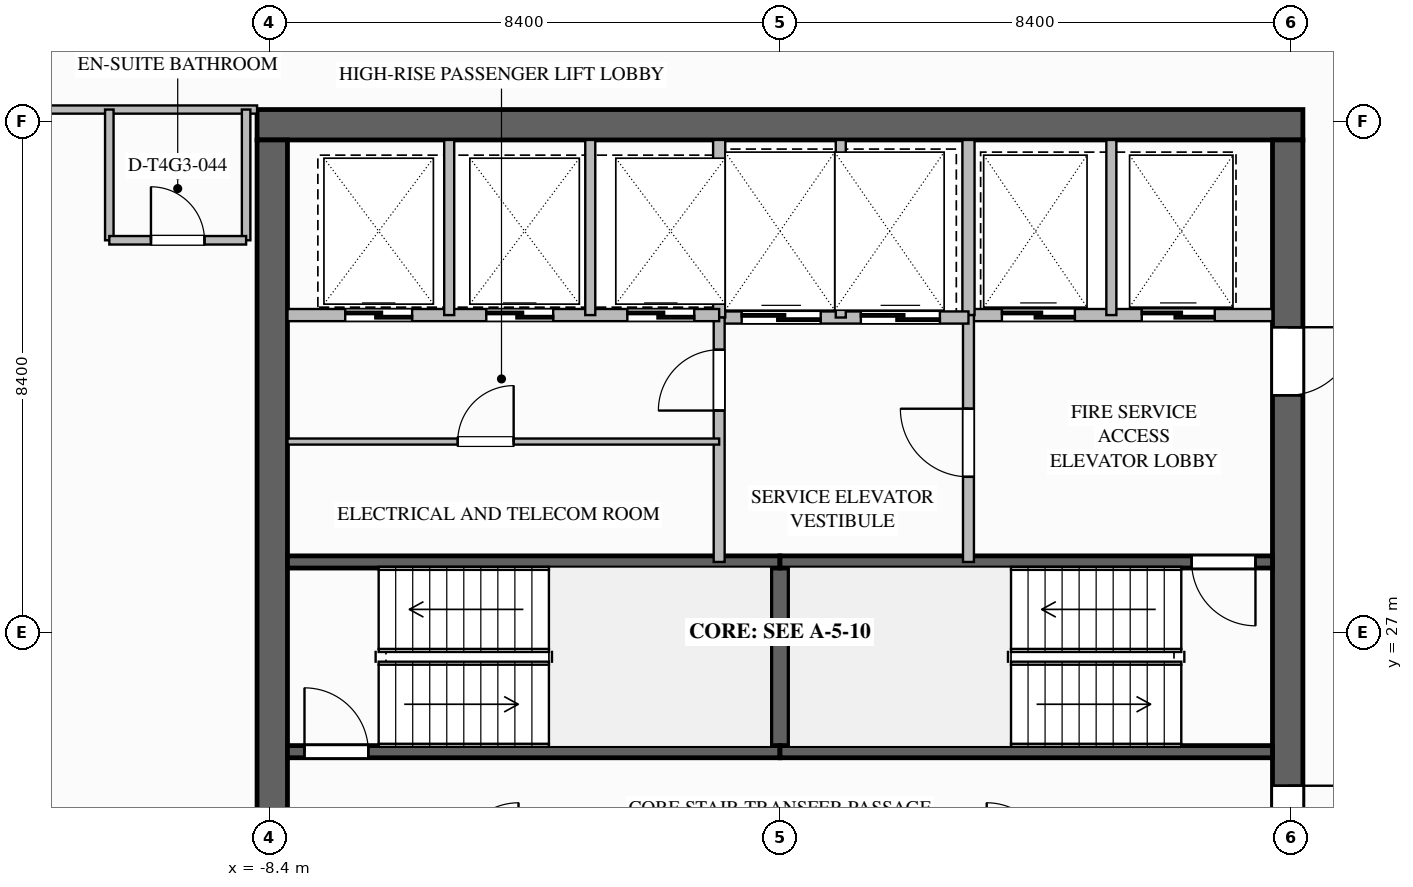
"""IFC4 building model, lengths in metres.
Left out: names, types, materials, properties, quantities, classifications, styles, units other than length and angle.
Written with IfcOpenShell. Run it as: python <this file> out.ifc"""

import sys

from ifc_helpers import new_model, si_unit, direction, frame, frame_2d, origin, place, context, subcontext, project, spatial, rectangle, extrude, element, fill, save


model = new_model("IFC4")
c1 = context("Model", 3, precision=1e-05, world=origin(), true_north=direction((0.0, 1.0)))
c2 = subcontext(c1, "Body", "Model", "MODEL_VIEW")
j1 = project(units=[si_unit("LENGTHUNIT", "METRE"), si_unit("PLANEANGLEUNIT", "RADIAN")], contexts=[c1])
p1 = place(None, origin())
s1 = spatial("IfcSite", under=j1, at=p1, CompositionType="ELEMENT")
p2 = place(p1, origin())
s2 = spatial("IfcBuilding", under=s1, at=p2, CompositionType="ELEMENT")
p3 = place(p2, frame((0.0, 0.0, 226.7)))
s3 = spatial("IfcBuildingStorey", under=s2, at=p3, CompositionType="ELEMENT", Elevation=226.7)
p4 = place(p3, frame((-8.6, 35.35, 0.0), z_axis=(0.0, 0.0, 1.0), x_axis=(1.0, 0.0, 0.0)))
e1 = element("IfcWall", 1, at=p4, inside=s3, PredefinedType="SHEAR", context=c2, shape_type="SweptSolid", body=[
    extrude(rectangle(XDim=17.2, YDim=0.5, at=frame_2d((8.6, 0.0))), origin(), (0.0, 0.0, 1.0), 3.6),
])
p5 = place(p3, frame((8.35, 35.1, 0.0), z_axis=(0.0, 0.0, 1.0), x_axis=(0.0, -1.0, 0.0)))
e2 = element("IfcWall", 2, at=p5, inside=s3, PredefinedType="SHEAR", context=c2, shape_type="SweptSolid", body=[
    extrude(rectangle(XDim=16.2, YDim=0.5, at=frame_2d((8.1, 0.0))), origin(), (0.0, 0.0, 1.0), 3.6),
])
p6 = place(p5, frame((3.08, 0.0, 0.0)))
e3 = element("IfcOpeningElement", 3, at=p6, cuts=e2, PredefinedType="OPENING", context=c2, shape_type="SweptSolid", body=[
    extrude(rectangle(XDim=1.12, YDim=2.1, at=frame_2d((0.56, 1.05))), frame((0.0, 0.26, 0.0), z_axis=(0.0, -1.0, 0.0), x_axis=(1.0, 0.0, 0.0)), (0.0, 0.0, 1.0), 0.52),
])
p7 = place(p5, frame((10.62, 0.0, 0.0)))
e4 = element("IfcOpeningElement", 4, at=p7, cuts=e2, PredefinedType="OPENING", context=c2, shape_type="SweptSolid", body=[
    extrude(rectangle(XDim=1.08, YDim=2.04, at=frame_2d((0.54, 1.02))), frame((0.0, 0.26, 0.0), z_axis=(0.0, -1.0, 0.0), x_axis=(1.0, 0.0, 0.0)), (0.0, 0.0, 1.0), 0.52),
])
p8 = place(p3, frame((-8.35, 18.9, 0.0), z_axis=(0.0, 0.0, 1.0), x_axis=(0.0, 1.0, 0.0)))
e5 = element("IfcWall", 5, at=p8, inside=s3, PredefinedType="SHEAR", context=c2, shape_type="SweptSolid", body=[
    extrude(rectangle(XDim=16.2, YDim=0.5, at=frame_2d((8.1, 0.0))), origin(), (0.0, 0.0, 1.0), 3.6),
])
p9 = place(p3, frame((0.0, 25.04, 0.0), z_axis=(0.0, 0.0, 1.0), x_axis=(0.0, 1.0, 0.0)))
e6 = element("IfcWall", 6, at=p9, inside=s3, PredefinedType="SOLIDWALL", context=c2, shape_type="SweptSolid", body=[
    extrude(rectangle(XDim=3.12, YDim=0.3, at=frame_2d((1.56, 0.0))), origin(), (0.0, 0.0, 1.0), 3.34),
])
p10 = place(p3, frame((-8.1, 25.04, 0.0), z_axis=(0.0, 0.0, 1.0), x_axis=(1.0, 0.0, 0.0)))
e7 = element("IfcWall", 7, at=p10, inside=s3, PredefinedType="SOLIDWALL", context=c2, shape_type="SweptSolid", body=[
    extrude(rectangle(XDim=8.1, YDim=0.2, at=frame_2d((4.05, 0.0))), origin(), (0.0, 0.0, 1.0), 3.34),
])
p11 = place(p10, frame((0.28, 0.0, 0.0)))
e8 = element("IfcOpeningElement", 8, at=p11, cuts=e7, PredefinedType="OPENING", context=c2, shape_type="SweptSolid", body=[
    extrude(rectangle(XDim=1.05, YDim=2.1, at=frame_2d((0.525, 1.05))), frame((0.0, 0.11, 0.0), z_axis=(0.0, -1.0, 0.0), x_axis=(1.0, 0.0, 0.0)), (0.0, 0.0, 1.0), 0.22),
])
for number, where, z_axis, x_axis in (
    (9, (-8.1, 28.16, 0.0), (0.0, 0.0, 1.0), (1.0, 0.0, 0.0)),
    (10, (0.0, 25.04, 0.0), (0.0, 0.0, 1.0), (1.0, 0.0, 0.0)),
):
    element("IfcWall", number, at=place(p3, frame(where, z_axis=z_axis, x_axis=x_axis)), inside=s3, PredefinedType="SOLIDWALL", context=c2, shape_type="SweptSolid", body=[
        extrude(rectangle(XDim=8.1, YDim=0.2, at=frame_2d((4.05, 0.0))), origin(), (0.0, 0.0, 1.0), 3.34),
    ])
p12 = place(p3, frame((8.1, 28.16, 0.0), z_axis=(0.0, 0.0, 1.0), x_axis=(-1.0, 0.0, 0.0)))
e11 = element("IfcWall", 11, at=p12, inside=s3, PredefinedType="SOLIDWALL", context=c2, shape_type="SweptSolid", body=[
    extrude(rectangle(XDim=8.1, YDim=0.2, at=frame_2d((4.05, 0.0))), origin(), (0.0, 0.0, 1.0), 3.34),
])
p13 = place(p12, frame((0.28, 0.0, 0.0)))
e12 = element("IfcOpeningElement", 12, at=p13, cuts=e11, PredefinedType="OPENING", context=c2, shape_type="SweptSolid", body=[
    extrude(rectangle(XDim=1.05, YDim=2.1, at=frame_2d((0.525, 1.05))), frame((0.0, 0.11, 0.0), z_axis=(0.0, -1.0, 0.0), x_axis=(1.0, 0.0, 0.0)), (0.0, 0.0, 1.0), 0.22),
])
p14 = place(p3, frame((3.1, 32.22, 0.0), z_axis=(0.0, 0.0, 1.0), x_axis=(1.0, 0.0, 0.0)))
e13 = element("IfcWall", 13, at=p14, inside=s3, PredefinedType="SOLIDWALL", context=c2, shape_type="SweptSolid", body=[
    extrude(rectangle(XDim=5.0, YDim=0.2, at=frame_2d((2.5, 0.0))), origin(), (0.0, 0.0, 1.0), 3.34),
])
p15 = place(p14, frame((0.55, 0.0, 0.0)))
e14 = element("IfcOpeningElement", 14, at=p15, cuts=e13, PredefinedType="OPENING", context=c2, shape_type="SweptSolid", body=[
    extrude(rectangle(XDim=1.2, YDim=2.2, at=frame_2d((0.6, 1.1))), frame((0.0, 0.11, 0.0), z_axis=(0.0, -1.0, 0.0), x_axis=(1.0, 0.0, 0.0)), (0.0, 0.0, 1.0), 0.22),
])
p16 = place(p14, frame((2.85, 0.0, 0.0)))
e15 = element("IfcOpeningElement", 15, at=p16, cuts=e13, PredefinedType="OPENING", context=c2, shape_type="SweptSolid", body=[
    extrude(rectangle(XDim=1.2, YDim=2.2, at=frame_2d((0.6, 1.1))), frame((0.0, 0.11, 0.0), z_axis=(0.0, -1.0, 0.0), x_axis=(1.0, 0.0, 0.0)), (0.0, 0.0, 1.0), 0.22),
])
p17 = place(p3, frame((3.1, 32.22, 0.0), z_axis=(0.0, 0.0, 1.0), x_axis=(0.0, 1.0, 0.0)))
e16 = element("IfcWall", 16, at=p17, inside=s3, PredefinedType="SOLIDWALL", context=c2, shape_type="SweptSolid", body=[
    extrude(rectangle(XDim=2.88, YDim=0.2, at=frame_2d((1.44, 0.0))), origin(), (0.0, 0.0, 1.0), 3.34),
])
p18 = place(p3, frame((5.45, 32.22, 0.0), z_axis=(0.0, 0.0, 1.0), x_axis=(0.0, 1.0, 0.0)))
e17 = element("IfcWall", 17, at=p18, inside=s3, PredefinedType="PARTITIONING", context=c2, shape_type="SweptSolid", body=[
    extrude(rectangle(XDim=2.88, YDim=0.165, at=frame_2d((1.44, 0.0))), origin(), (0.0, 0.0, 1.0), 3.34),
])
p19 = place(p3, frame((3.1, 28.16, 0.0), z_axis=(0.0, 0.0, 1.0), x_axis=(0.0, 1.0, 0.0)))
e18 = element("IfcWall", 18, at=p19, inside=s3, PredefinedType="SOLIDWALL", context=c2, shape_type="SweptSolid", body=[
    extrude(rectangle(XDim=4.06, YDim=0.18, at=frame_2d((2.03, 0.0))), origin(), (0.0, 0.0, 1.0), 3.34),
])
p20 = place(p19, frame((1.4, 0.0, 0.0)))
e19 = element("IfcOpeningElement", 19, at=p20, cuts=e18, PredefinedType="OPENING", context=c2, shape_type="SweptSolid", body=[
    extrude(rectangle(XDim=1.12, YDim=2.1, at=frame_2d((0.56, 1.05))), frame((0.0, 0.1, 0.0), z_axis=(0.0, -1.0, 0.0), x_axis=(1.0, 0.0, 0.0)), (0.0, 0.0, 1.0), 0.2),
])
p21 = place(p3, frame((-1.0, 32.18, 0.0), z_axis=(0.0, 0.0, 1.0), x_axis=(1.0, 0.0, 0.0)))
e20 = element("IfcWall", 20, at=p21, inside=s3, PredefinedType="SOLIDWALL", context=c2, shape_type="SweptSolid", body=[
    extrude(rectangle(XDim=4.1, YDim=0.2, at=frame_2d((2.05, 0.0))), origin(), (0.0, 0.0, 1.0), 3.34),
])
p22 = place(p21, frame((0.37, 0.0, 0.0)))
e21 = element("IfcOpeningElement", 21, at=p22, cuts=e20, PredefinedType="OPENING", context=c2, shape_type="SweptSolid", body=[
    extrude(rectangle(XDim=1.3, YDim=2.2, at=frame_2d((0.65, 1.1))), frame((0.0, 0.11, 0.0), z_axis=(0.0, -1.0, 0.0), x_axis=(1.0, 0.0, 0.0)), (0.0, 0.0, 1.0), 0.22),
])
p23 = place(p21, frame((2.33, 0.0, 0.0)))
e22 = element("IfcOpeningElement", 22, at=p23, cuts=e20, PredefinedType="OPENING", context=c2, shape_type="SweptSolid", body=[
    extrude(rectangle(XDim=1.3, YDim=2.2, at=frame_2d((0.65, 1.1))), frame((0.0, 0.11, 0.0), z_axis=(0.0, -1.0, 0.0), x_axis=(1.0, 0.0, 0.0)), (0.0, 0.0, 1.0), 0.22),
])
p24 = place(p3, frame((-1.0, 32.18, 0.0), z_axis=(0.0, 0.0, 1.0), x_axis=(0.0, 1.0, 0.0)))
e23 = element("IfcWall", 23, at=p24, inside=s3, PredefinedType="SOLIDWALL", context=c2, shape_type="SweptSolid", body=[
    extrude(rectangle(XDim=2.92, YDim=0.2, at=frame_2d((1.46, 0.0))), origin(), (0.0, 0.0, 1.0), 3.34),
])
p25 = place(p3, frame((1.0, 32.18, 0.0), z_axis=(0.0, 0.0, 1.0), x_axis=(0.0, 1.0, 0.0)))
e24 = element("IfcWall", 24, at=p25, inside=s3, PredefinedType="PARTITIONING", context=c2, shape_type="SweptSolid", body=[
    extrude(rectangle(XDim=2.92, YDim=0.165, at=frame_2d((1.46, 0.0))), origin(), (0.0, 0.0, 1.0), 3.34),
])
p26 = place(p3, frame((-1.0, 28.16, 0.0), z_axis=(0.0, 0.0, 1.0), x_axis=(0.0, 1.0, 0.0)))
e25 = element("IfcWall", 25, at=p26, inside=s3, PredefinedType="SOLIDWALL", context=c2, shape_type="SweptSolid", body=[
    extrude(rectangle(XDim=4.02, YDim=0.18, at=frame_2d((2.01, 0.0))), origin(), (0.0, 0.0, 1.0), 3.34),
])
p27 = place(p26, frame((2.49, 0.0, 0.0)))
e26 = element("IfcOpeningElement", 26, at=p27, cuts=e25, PredefinedType="OPENING", context=c2, shape_type="SweptSolid", body=[
    extrude(rectangle(XDim=1.0, YDim=2.1, at=frame_2d((0.5, 1.05))), frame((0.0, 0.1, 0.0), z_axis=(0.0, -1.0, 0.0), x_axis=(1.0, 0.0, 0.0)), (0.0, 0.0, 1.0), 0.2),
])
p28 = place(p3, frame((-8.1, 32.22, 0.0), z_axis=(0.0, 0.0, 1.0), x_axis=(1.0, 0.0, 0.0)))
e27 = element("IfcWall", 27, at=p28, inside=s3, PredefinedType="SOLIDWALL", context=c2, shape_type="SweptSolid", body=[
    extrude(rectangle(XDim=7.1, YDim=0.2, at=frame_2d((3.55, 0.0))), origin(), (0.0, 0.0, 1.0), 3.34),
])
p29 = place(p28, frame((0.95, 0.0, 0.0)))
e28 = element("IfcOpeningElement", 28, at=p29, cuts=e27, PredefinedType="OPENING", context=c2, shape_type="SweptSolid", body=[
    extrude(rectangle(XDim=1.1, YDim=2.2, at=frame_2d((0.55, 1.1))), frame((0.0, 0.11, 0.0), z_axis=(0.0, -1.0, 0.0), x_axis=(1.0, 0.0, 0.0)), (0.0, 0.0, 1.0), 0.22),
])
p30 = place(p28, frame((3.27, 0.0, 0.0)))
e29 = element("IfcOpeningElement", 29, at=p30, cuts=e27, PredefinedType="OPENING", context=c2, shape_type="SweptSolid", body=[
    extrude(rectangle(XDim=1.1, YDim=2.2, at=frame_2d((0.55, 1.1))), frame((0.0, 0.11, 0.0), z_axis=(0.0, -1.0, 0.0), x_axis=(1.0, 0.0, 0.0)), (0.0, 0.0, 1.0), 0.22),
])
p31 = place(p28, frame((5.59, 0.0, 0.0)))
e30 = element("IfcOpeningElement", 30, at=p31, cuts=e27, PredefinedType="OPENING", context=c2, shape_type="SweptSolid", body=[
    extrude(rectangle(XDim=1.1, YDim=2.2, at=frame_2d((0.55, 1.1))), frame((0.0, 0.11, 0.0), z_axis=(0.0, -1.0, 0.0), x_axis=(1.0, 0.0, 0.0)), (0.0, 0.0, 1.0), 0.22),
])
for number, where, z_axis, x_axis in (
    (31, (-5.44, 32.22, 0.0), (0.0, 0.0, 1.0), (0.0, 1.0, 0.0)),
    (32, (-3.12, 32.22, 0.0), (0.0, 0.0, 1.0), (0.0, 1.0, 0.0)),
):
    element("IfcWall", number, at=place(p3, frame(where, z_axis=z_axis, x_axis=x_axis)), inside=s3, PredefinedType="PARTITIONING", context=c2, shape_type="SweptSolid", body=[
        extrude(rectangle(XDim=2.88, YDim=0.165, at=frame_2d((1.44, 0.0))), origin(), (0.0, 0.0, 1.0), 3.34),
    ])
p32 = place(p3, frame((-8.1, 30.14, 0.0), z_axis=(0.0, 0.0, 1.0), x_axis=(1.0, 0.0, 0.0)))
e33 = element("IfcWall", 33, at=p32, inside=s3, PredefinedType="PARTITIONING", context=c2, shape_type="SweptSolid", body=[
    extrude(rectangle(XDim=7.1, YDim=0.1, at=frame_2d((3.55, 0.0))), origin(), (0.0, 0.0, 1.0), 3.34),
])
p33 = place(p32, frame((2.8, 0.0, 0.0)))
e34 = element("IfcOpeningElement", 34, at=p33, cuts=e33, PredefinedType="OPENING", context=c2, shape_type="SweptSolid", body=[
    extrude(rectangle(XDim=0.92, YDim=2.1, at=frame_2d((0.46, 1.05))), frame((0.0, 0.06, 0.0), z_axis=(0.0, -1.0, 0.0), x_axis=(1.0, 0.0, 0.0)), (0.0, 0.0, 1.0), 0.12),
])
p34 = place(p3, frame((-16.2, 35.6, 0.0), z_axis=(0.0, 0.0, 1.0), x_axis=(1.0, 0.0, 0.0)))
e35 = element("IfcWall", 35, at=p34, inside=s3, PredefinedType="PARTITIONING", context=c2, shape_type="SweptSolid", body=[
    extrude(rectangle(XDim=7.6, YDim=0.135, at=frame_2d((3.8, 0.0))), origin(), (0.0, 0.0, 1.0), 2.718),
])
p35 = place(p34, frame((2.155, 0.0, 0.0)))
e36 = element("IfcOpeningElement", 36, at=p35, cuts=e35, PredefinedType="OPENING", context=c2, shape_type="SweptSolid", body=[
    extrude(rectangle(XDim=1.26, YDim=2.2, at=frame_2d((0.63, 1.1))), frame((0.0, 0.077, 0.0), z_axis=(0.0, -1.0, 0.0), x_axis=(1.0, 0.0, 0.0)), (0.0, 0.0, 1.0), 0.155),
])
for number, where, z_axis, x_axis in (
    (37, (-11.03, 35.6, 0.0), (0.0, 0.0, 1.0), (0.0, -1.0, 0.0)),
    (38, (-8.78, 35.6, 0.0), (0.0, 0.0, 1.0), (0.0, -1.0, 0.0)),
):
    element("IfcWall", number, at=place(p3, frame(where, z_axis=z_axis, x_axis=x_axis)), inside=s3, PredefinedType="PLUMBINGWALL", context=c2, shape_type="SweptSolid", body=[
        extrude(rectangle(XDim=2.15, YDim=0.14, at=frame_2d((1.075, 0.0))), origin(), (0.0, 0.0, 1.0), 3.34),
    ])
p36 = place(p3, frame((-11.03, 33.45, 0.0), z_axis=(0.0, 0.0, 1.0), x_axis=(1.0, 0.0, 0.0)))
e39 = element("IfcWall", 39, at=p36, inside=s3, PredefinedType="PLUMBINGWALL", context=c2, shape_type="SweptSolid", body=[
    extrude(rectangle(XDim=2.25, YDim=0.14, at=frame_2d((1.125, 0.0))), origin(), (0.0, 0.0, 1.0), 3.34),
])
p37 = place(p36, frame((0.685, 0.0, 0.0)))
e40 = element("IfcOpeningElement", 40, at=p37, cuts=e39, PredefinedType="OPENING", context=c2, shape_type="SweptSolid", body=[
    extrude(rectangle(XDim=0.88, YDim=2.1, at=frame_2d((0.44, 1.05))), frame((0.0, 0.08, 0.0), z_axis=(0.0, -1.0, 0.0), x_axis=(1.0, 0.0, 0.0)), (0.0, 0.0, 1.0), 0.16),
])
p38 = place(p11, origin())
e41 = element("IfcDoor", 41, at=p38, inside=s3, OperationType="SINGLE_SWING_LEFT", PredefinedType="DOOR", context=c2, shape_type="SweptSolid", body=[
    extrude(rectangle(XDim=1.05, YDim=2.1, at=frame_2d((0.525, 1.05))), frame((0.0, 0.025, 0.0), z_axis=(0.0, -1.0, 0.0), x_axis=(1.0, 0.0, 0.0)), (0.0, 0.0, 1.0), 0.05),
])
fill(e8, e41)
p39 = place(p13, origin())
e42 = element("IfcDoor", 42, at=p39, inside=s3, OperationType="SINGLE_SWING_LEFT", PredefinedType="DOOR", context=c2, shape_type="SweptSolid", body=[
    extrude(rectangle(XDim=1.05, YDim=2.1, at=frame_2d((0.525, 1.05))), frame((0.0, 0.025, 0.0), z_axis=(0.0, -1.0, 0.0), x_axis=(1.0, 0.0, 0.0)), (0.0, 0.0, 1.0), 0.05),
])
fill(e12, e42)
p40 = place(p15, origin())
e43 = element("IfcDoor", 43, at=p40, inside=s3, OperationType="SLIDING_TO_LEFT", PredefinedType="DOOR", context=c2, shape_type="SweptSolid", body=[
    extrude(rectangle(XDim=1.2, YDim=2.2, at=frame_2d((0.6, 1.1))), frame((0.0, 0.025, 0.0), z_axis=(0.0, -1.0, 0.0), x_axis=(1.0, 0.0, 0.0)), (0.0, 0.0, 1.0), 0.05),
])
fill(e14, e43)
p41 = place(p16, origin())
e44 = element("IfcDoor", 44, at=p41, inside=s3, OperationType="SLIDING_TO_LEFT", PredefinedType="DOOR", context=c2, shape_type="SweptSolid", body=[
    extrude(rectangle(XDim=1.2, YDim=2.2, at=frame_2d((0.6, 1.1))), frame((0.0, 0.025, 0.0), z_axis=(0.0, -1.0, 0.0), x_axis=(1.0, 0.0, 0.0)), (0.0, 0.0, 1.0), 0.05),
])
fill(e15, e44)
p42 = place(p20, origin())
e45 = element("IfcDoor", 45, at=p42, inside=s3, OperationType="SINGLE_SWING_RIGHT", PredefinedType="DOOR", context=c2, shape_type="SweptSolid", body=[
    extrude(rectangle(XDim=1.12, YDim=2.1, at=frame_2d((0.56, 1.05))), frame((0.0, 0.025, 0.0), z_axis=(0.0, -1.0, 0.0), x_axis=(1.0, 0.0, 0.0)), (0.0, 0.0, 1.0), 0.05),
])
fill(e19, e45)
p43 = place(p6, origin())
e46 = element("IfcDoor", 46, at=p43, inside=s3, OperationType="SINGLE_SWING_LEFT", PredefinedType="DOOR", context=c2, shape_type="SweptSolid", body=[
    extrude(rectangle(XDim=1.12, YDim=2.1, at=frame_2d((0.56, 1.05))), frame((0.0, 0.025, 0.0), z_axis=(0.0, -1.0, 0.0), x_axis=(1.0, 0.0, 0.0)), (0.0, 0.0, 1.0), 0.05),
])
fill(e3, e46)
p44 = place(p22, origin())
e47 = element("IfcDoor", 47, at=p44, inside=s3, OperationType="SLIDING_TO_LEFT", PredefinedType="DOOR", context=c2, shape_type="SweptSolid", body=[
    extrude(rectangle(XDim=1.3, YDim=2.2, at=frame_2d((0.65, 1.1))), frame((0.0, 0.025, 0.0), z_axis=(0.0, -1.0, 0.0), x_axis=(1.0, 0.0, 0.0)), (0.0, 0.0, 1.0), 0.05),
])
fill(e21, e47)
p45 = place(p23, origin())
e48 = element("IfcDoor", 48, at=p45, inside=s3, OperationType="SLIDING_TO_LEFT", PredefinedType="DOOR", context=c2, shape_type="SweptSolid", body=[
    extrude(rectangle(XDim=1.3, YDim=2.2, at=frame_2d((0.65, 1.1))), frame((0.0, 0.025, 0.0), z_axis=(0.0, -1.0, 0.0), x_axis=(1.0, 0.0, 0.0)), (0.0, 0.0, 1.0), 0.05),
])
fill(e22, e48)
p46 = place(p27, origin())
e49 = element("IfcDoor", 49, at=p46, inside=s3, OperationType="SINGLE_SWING_LEFT", PredefinedType="DOOR", context=c2, shape_type="SweptSolid", body=[
    extrude(rectangle(XDim=1.0, YDim=2.1, at=frame_2d((0.5, 1.05))), frame((0.0, 0.025, 0.0), z_axis=(0.0, -1.0, 0.0), x_axis=(1.0, 0.0, 0.0)), (0.0, 0.0, 1.0), 0.05),
])
fill(e26, e49)
p47 = place(p29, origin())
e50 = element("IfcDoor", 50, at=p47, inside=s3, OperationType="SLIDING_TO_LEFT", PredefinedType="DOOR", context=c2, shape_type="SweptSolid", body=[
    extrude(rectangle(XDim=1.1, YDim=2.2, at=frame_2d((0.55, 1.1))), frame((0.0, 0.025, 0.0), z_axis=(0.0, -1.0, 0.0), x_axis=(1.0, 0.0, 0.0)), (0.0, 0.0, 1.0), 0.05),
])
fill(e28, e50)
p48 = place(p30, origin())
e51 = element("IfcDoor", 51, at=p48, inside=s3, OperationType="SLIDING_TO_LEFT", PredefinedType="DOOR", context=c2, shape_type="SweptSolid", body=[
    extrude(rectangle(XDim=1.1, YDim=2.2, at=frame_2d((0.55, 1.1))), frame((0.0, 0.025, 0.0), z_axis=(0.0, -1.0, 0.0), x_axis=(1.0, 0.0, 0.0)), (0.0, 0.0, 1.0), 0.05),
])
fill(e29, e51)
p49 = place(p31, origin())
e52 = element("IfcDoor", 52, at=p49, inside=s3, OperationType="SLIDING_TO_LEFT", PredefinedType="DOOR", context=c2, shape_type="SweptSolid", body=[
    extrude(rectangle(XDim=1.1, YDim=2.2, at=frame_2d((0.55, 1.1))), frame((0.0, 0.025, 0.0), z_axis=(0.0, -1.0, 0.0), x_axis=(1.0, 0.0, 0.0)), (0.0, 0.0, 1.0), 0.05),
])
fill(e30, e52)
p50 = place(p33, origin())
e53 = element("IfcDoor", 53, at=p50, inside=s3, OperationType="SINGLE_SWING_RIGHT", PredefinedType="DOOR", context=c2, shape_type="SweptSolid", body=[
    extrude(rectangle(XDim=0.92, YDim=2.1, at=frame_2d((0.46, 1.05))), frame((0.0, 0.025, 0.0), z_axis=(0.0, -1.0, 0.0), x_axis=(1.0, 0.0, 0.0)), (0.0, 0.0, 1.0), 0.05),
])
fill(e34, e53)
p51 = place(p7, origin())
e54 = element("IfcDoor", 54, at=p51, inside=s3, OperationType="SINGLE_SWING_LEFT", PredefinedType="DOOR", context=c2, shape_type="SweptSolid", body=[
    extrude(rectangle(XDim=1.08, YDim=2.04, at=frame_2d((0.54, 1.02))), frame((0.0, 0.025, 0.0), z_axis=(0.0, -1.0, 0.0), x_axis=(1.0, 0.0, 0.0)), (0.0, 0.0, 1.0), 0.05),
])
fill(e4, e54)
p52 = place(p37, origin())
e55 = element("IfcDoor", 55, at=p52, inside=s3, OperationType="SINGLE_SWING_LEFT", PredefinedType="DOOR", context=c2, shape_type="SweptSolid", body=[
    extrude(rectangle(XDim=0.88, YDim=2.1, at=frame_2d((0.44, 1.05))), frame((0.0, 0.025, 0.0), z_axis=(0.0, -1.0, 0.0), x_axis=(1.0, 0.0, 0.0)), (0.0, 0.0, 1.0), 0.05),
])
fill(e40, e55)
save(model, sys.argv[1])
